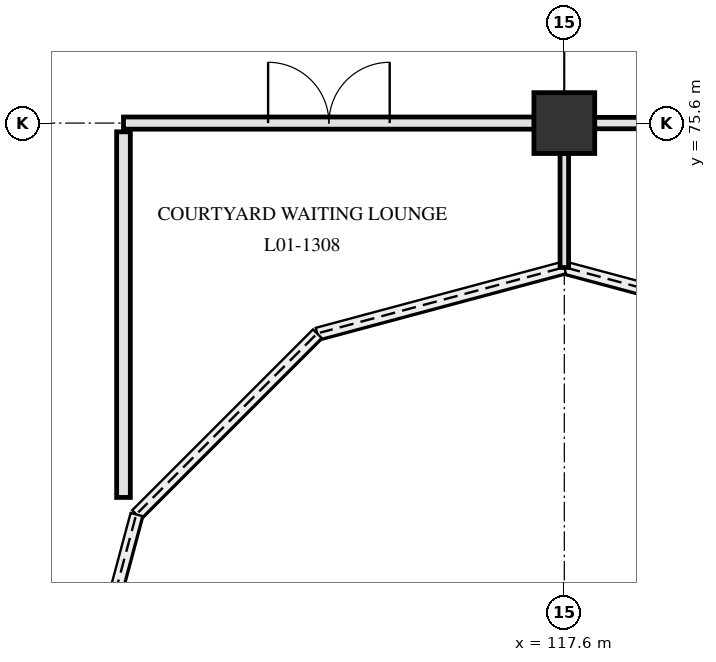
"""IFC4 building model, lengths in metres.
Left out: names, types, materials, properties, quantities, classifications, styles, units other than length and angle.
Written with IfcOpenShell. Run it as: python <this file> out.ifc"""

import sys

from ifc_helpers import new_model, si_unit, direction, frame, frame_2d, origin, origin_2d, place, context, subcontext, project, spatial, rectangle, circle, extrude, element, fill, save


model = new_model("IFC4")
c1 = context("Model", 3, precision=1e-05, world=origin(), true_north=direction((0.0, 1.0)))
c2 = subcontext(c1, "Body", "Model", "MODEL_VIEW")
j1 = project(units=[si_unit("LENGTHUNIT", "METRE"), si_unit("PLANEANGLEUNIT", "RADIAN")], contexts=[c1])
p1 = place(None, origin())
s1 = spatial("IfcSite", under=j1, at=p1, CompositionType="ELEMENT")
p2 = place(p1, origin())
s2 = spatial("IfcBuilding", under=s1, at=p2, CompositionType="ELEMENT")
p3 = place(p2, frame((0.0, 0.0, 4.8)))
s3 = spatial("IfcBuildingStorey", under=s2, at=p3, CompositionType="ELEMENT", Elevation=4.8)
p4 = place(p3, frame((117.6, 75.6, 0.0), z_axis=(0.0, 0.0, 1.0), x_axis=(1.0, 0.0, 0.0)))
e1 = element("IfcColumn", 1, at=p4, inside=s3, PredefinedType="COLUMN", context=c2, shape_type="SweptSolid", body=[
    extrude(circle(Radius=0.4, at=origin_2d()), origin(), (0.0, 0.0, 1.0), 4.5),
])
p5 = place(p3, frame((111.8, 75.6, 0.0), z_axis=(0.0, 0.0, 1.0), x_axis=(1.0, 0.0, 0.0)))
e2 = element("IfcWall", 2, at=p5, inside=s3, PredefinedType="PARTITIONING", context=c2, shape_type="SweptSolid", body=[
    extrude(rectangle(XDim=5.405, YDim=0.16, at=frame_2d((2.703, 0.0))), origin(), (0.0, 0.0, 1.0), 3.54),
])
p6 = place(p5, frame((1.903, 0.0, 0.0)))
e3 = element("IfcOpeningElement", 3, at=p6, cuts=e2, PredefinedType="OPENING", context=c2, shape_type="SweptSolid", body=[
    extrude(rectangle(XDim=1.6, YDim=2.25, at=frame_2d((0.8, 1.125))), frame((0.0, 0.09, 0.0), z_axis=(0.0, -1.0, 0.0), x_axis=(1.0, 0.0, 0.0)), (0.0, 0.0, 1.0), 0.18),
])
p7 = place(p3, frame((117.995, 75.6, 0.0), z_axis=(0.0, 0.0, 1.0), x_axis=(1.0, 0.0, 0.0)))
e4 = element("IfcWall", 4, at=p7, inside=s3, PredefinedType="PARTITIONING", context=c2, shape_type="SweptSolid", body=[
    extrude(rectangle(XDim=7.61, YDim=0.15, at=frame_2d((3.805, 0.0))), origin(), (0.0, 0.0, 1.0), 3.54),
])
p8 = place(p7, frame((3.295, 0.0, 0.0)))
e5 = element("IfcOpeningElement", 5, at=p8, cuts=e4, PredefinedType="OPENING", context=c2, shape_type="SweptSolid", body=[
    extrude(rectangle(XDim=1.02, YDim=2.12, at=frame_2d((0.51, 1.06))), frame((0.0, 0.085, 0.0), z_axis=(0.0, -1.0, 0.0), x_axis=(1.0, 0.0, 0.0)), (0.0, 0.0, 1.0), 0.17),
])
p9 = place(p3, frame((111.8, 70.675, 0.0), z_axis=(0.0, 0.0, 1.0), x_axis=(0.0, 1.0, 0.0)))
e6 = element("IfcWall", 6, at=p9, inside=s3, PredefinedType="PARTITIONING", context=c2, shape_type="SweptSolid", body=[
    extrude(rectangle(XDim=4.81, YDim=0.18, at=frame_2d((2.405, 0.0))), origin(), (0.0, 0.0, 1.0), 3.54),
])
p10 = place(p3, frame((117.6, 73.7, 0.0), z_axis=(0.0, 0.0, 1.0), x_axis=(0.0, 1.0, 0.0)))
e7 = element("IfcWall", 7, at=p10, inside=s3, PredefinedType="PARTITIONING", context=c2, shape_type="SweptSolid", body=[
    extrude(rectangle(XDim=1.505, YDim=0.112, at=frame_2d((0.752, 0.0))), origin(), (0.0, 0.0, 1.0), 4.14),
])
p11 = place(p6, origin())
e8 = element("IfcDoor", 8, at=p11, inside=s3, OperationType="DOUBLE_SWING_LEFT", PredefinedType="DOOR", context=c2, shape_type="SweptSolid", body=[
    extrude(rectangle(XDim=1.6, YDim=2.25, at=frame_2d((0.8, 1.125))), frame((0.0, 0.025, 0.0), z_axis=(0.0, -1.0, 0.0), x_axis=(1.0, 0.0, 0.0)), (0.0, 0.0, 1.0), 0.05),
])
fill(e3, e8)
save(model, sys.argv[1])
